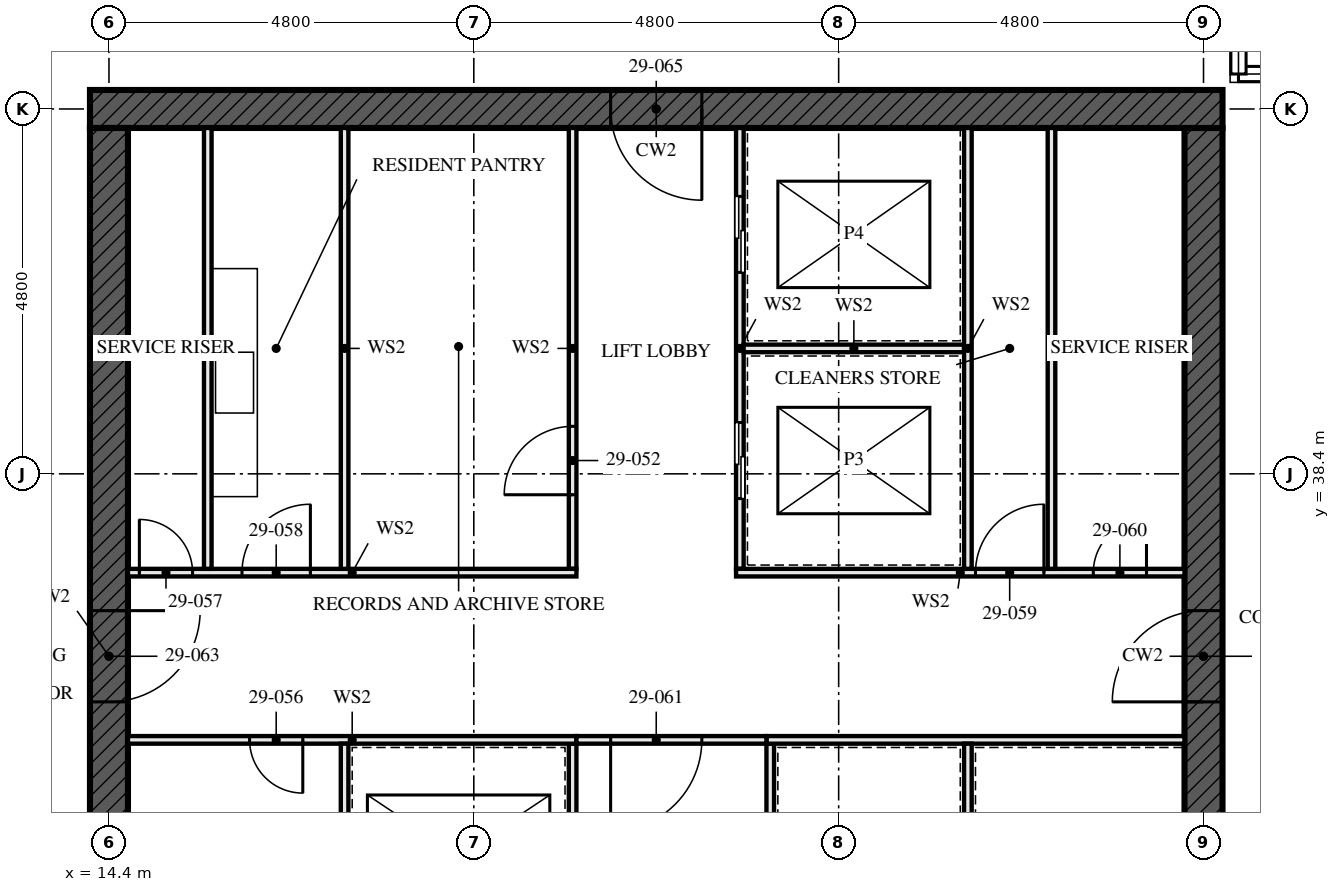
"""IFC4 building model, lengths in metres.
Left out: names, types, materials, properties, quantities, classifications, styles, units other than length and angle.
Written with IfcOpenShell. Run it as: python <this file> out.ifc"""

import sys

from ifc_helpers import new_model, si_unit, direction, frame, frame_2d, origin, place, context, subcontext, project, spatial, rectangle, extrude, element, fill, save


model = new_model("IFC4")
c1 = context("Model", 3, precision=1e-05, world=origin(), true_north=direction((0.0, 1.0)))
c2 = subcontext(c1, "Body", "Model", "MODEL_VIEW")
j1 = project(units=[si_unit("LENGTHUNIT", "METRE"), si_unit("PLANEANGLEUNIT", "RADIAN")], contexts=[c1])
p1 = place(None, origin())
s1 = spatial("IfcSite", under=j1, at=p1, CompositionType="ELEMENT")
p2 = place(p1, origin())
s2 = spatial("IfcBuilding", under=s1, at=p2, CompositionType="ELEMENT")
p3 = place(p2, frame((0.0, 0.0, 108.5)))
s3 = spatial("IfcBuildingStorey", under=s2, at=p3, CompositionType="ELEMENT", Elevation=108.5)
p4 = place(p3, frame((29.05, 43.2, -0.17), z_axis=(0.0, 0.0, 1.0), x_axis=(-1.0, 0.0, 0.0)))
e1 = element("IfcWall", 1, at=p4, inside=s3, PredefinedType="SHEAR", context=c2, shape_type="SweptSolid", body=[
    extrude(rectangle(XDim=14.9, YDim=0.5, at=frame_2d((7.45, 0.0))), origin(), (0.0, 0.0, 1.0), 3.5),
])
p5 = place(p4, frame((6.85, 0.0, 0.17)))
e2 = element("IfcOpeningElement", 2, at=p5, cuts=e1, PredefinedType="OPENING", context=c2, shape_type="SweptSolid", body=[
    extrude(rectangle(XDim=1.2, YDim=2.1, at=frame_2d((0.6, 1.05))), frame((0.0, 0.26, 0.0), z_axis=(0.0, -1.0, 0.0), x_axis=(1.0, 0.0, 0.0)), (0.0, 0.0, 1.0), 0.521),
])
p6 = place(p3, frame((14.4, 42.95, -0.17), z_axis=(0.0, 0.0, 1.0), x_axis=(0.0, -1.0, 0.0)))
e3 = element("IfcWall", 3, at=p6, inside=s3, PredefinedType="SHEAR", context=c2, shape_type="SweptSolid", body=[
    extrude(rectangle(XDim=13.9, YDim=0.5, at=frame_2d((6.95, 0.0))), origin(), (0.0, 0.0, 1.0), 3.5),
])
p7 = place(p6, frame((6.35, 0.0, 0.17)))
e4 = element("IfcOpeningElement", 4, at=p7, cuts=e3, PredefinedType="OPENING", context=c2, shape_type="SweptSolid", body=[
    extrude(rectangle(XDim=1.2, YDim=2.1, at=frame_2d((0.6, 1.05))), frame((0.0, 0.26, 0.0), z_axis=(0.0, -1.0, 0.0), x_axis=(1.0, 0.0, 0.0)), (0.0, 0.0, 1.0), 0.521),
])
p8 = place(p3, frame((28.8, 29.05, -0.17), z_axis=(0.0, 0.0, 1.0), x_axis=(0.0, 1.0, 0.0)))
e5 = element("IfcWall", 5, at=p8, inside=s3, PredefinedType="SHEAR", context=c2, shape_type="SweptSolid", body=[
    extrude(rectangle(XDim=13.9, YDim=0.5, at=frame_2d((6.95, 0.0))), origin(), (0.0, 0.0, 1.0), 3.5),
])
p9 = place(p8, frame((6.35, 0.0, 0.17)))
e6 = element("IfcOpeningElement", 6, at=p9, cuts=e5, PredefinedType="OPENING", context=c2, shape_type="SweptSolid", body=[
    extrude(rectangle(XDim=1.2, YDim=2.1, at=frame_2d((0.6, 1.05))), frame((0.0, 0.26, 0.0), z_axis=(0.0, -1.0, 0.0), x_axis=(1.0, 0.0, 0.0)), (0.0, 0.0, 1.0), 0.521),
])
for number, where, z_axis, x_axis in (
    (7, (15.7, 37.15, 0.0), (0.0, 0.0, 1.0), (0.0, 1.0, 0.0)),
    (8, (26.8, 37.15, 0.0), (0.0, 0.0, 1.0), (0.0, 1.0, 0.0)),
):
    element("IfcWall", number, at=place(p3, frame(where, z_axis=z_axis, x_axis=x_axis)), inside=s3, PredefinedType="SOLIDWALL", context=c2, shape_type="SweptSolid", body=[
        extrude(rectangle(XDim=5.8, YDim=0.1, at=frame_2d((2.9, 0.0))), origin(), (0.0, 0.0, 1.0), 3.33),
    ])
p10 = place(p3, frame((20.5, 29.05, 0.0), z_axis=(0.0, 0.0, 1.0), x_axis=(0.0, 1.0, 0.0)))
e9 = element("IfcWall", 9, at=p10, inside=s3, PredefinedType="SOLIDWALL", context=c2, shape_type="SweptSolid", body=[
    extrude(rectangle(XDim=5.8, YDim=0.1, at=frame_2d((2.9, 0.0))), origin(), (0.0, 0.0, 1.0), 3.33),
])
p11 = place(p10, frame((0.8, 0.0, 0.0)))
e10 = element("IfcOpeningElement", 10, at=p11, cuts=e9, PredefinedType="OPENING", context=c2, shape_type="SweptSolid", body=[
    extrude(rectangle(XDim=1.1, YDim=2.3, at=frame_2d((0.55, 1.15))), frame((0.0, 0.061, 0.0), z_axis=(0.0, -1.0, 0.0), x_axis=(1.0, 0.0, 0.0)), (0.0, 0.0, 1.0), 0.121),
])
p12 = place(p10, frame((3.775, 0.0, 0.0)))
e11 = element("IfcOpeningElement", 11, at=p12, cuts=e9, PredefinedType="OPENING", context=c2, shape_type="SweptSolid", body=[
    extrude(rectangle(XDim=1.1, YDim=2.3, at=frame_2d((0.55, 1.15))), frame((0.0, 0.061, 0.0), z_axis=(0.0, -1.0, 0.0), x_axis=(1.0, 0.0, 0.0)), (0.0, 0.0, 1.0), 0.121),
])
p13 = place(p3, frame((20.5, 37.15, 0.0), z_axis=(0.0, 0.0, 1.0), x_axis=(0.0, 1.0, 0.0)))
e12 = element("IfcWall", 12, at=p13, inside=s3, PredefinedType="SOLIDWALL", context=c2, shape_type="SweptSolid", body=[
    extrude(rectangle(XDim=5.8, YDim=0.1, at=frame_2d((2.9, 0.0))), origin(), (0.0, 0.0, 1.0), 3.33),
])
p14 = place(p13, frame((0.975, 0.0, 0.0)))
e13 = element("IfcOpeningElement", 13, at=p14, cuts=e12, PredefinedType="OPENING", context=c2, shape_type="SweptSolid", body=[
    extrude(rectangle(XDim=0.9, YDim=2.1, at=frame_2d((0.45, 1.05))), frame((0.0, 0.061, 0.0), z_axis=(0.0, -1.0, 0.0), x_axis=(1.0, 0.0, 0.0)), (0.0, 0.0, 1.0), 0.121),
])
p15 = place(p3, frame((22.7, 37.15, 0.0), z_axis=(0.0, 0.0, 1.0), x_axis=(0.0, 1.0, 0.0)))
e14 = element("IfcWall", 14, at=p15, inside=s3, PredefinedType="SOLIDWALL", context=c2, shape_type="SweptSolid", body=[
    extrude(rectangle(XDim=5.8, YDim=0.1, at=frame_2d((2.9, 0.0))), origin(), (0.0, 0.0, 1.0), 3.33),
])
p16 = place(p15, frame((0.925, 0.0, 0.0)))
e15 = element("IfcOpeningElement", 15, at=p16, cuts=e14, PredefinedType="OPENING", context=c2, shape_type="SweptSolid", body=[
    extrude(rectangle(XDim=1.0, YDim=2.1, at=frame_2d((0.5, 1.05))), frame((0.0, 0.061, 0.0), z_axis=(0.0, -1.0, 0.0), x_axis=(1.0, 0.0, 0.0)), (0.0, 0.0, 1.0), 0.121),
])
p17 = place(p15, frame((3.9, 0.0, 0.0)))
e16 = element("IfcOpeningElement", 16, at=p17, cuts=e14, PredefinedType="OPENING", context=c2, shape_type="SweptSolid", body=[
    extrude(rectangle(XDim=1.0, YDim=2.1, at=frame_2d((0.5, 1.05))), frame((0.0, 0.061, 0.0), z_axis=(0.0, -1.0, 0.0), x_axis=(1.0, 0.0, 0.0)), (0.0, 0.0, 1.0), 0.121),
])
p18 = place(p3, frame((23.1, 29.05, 0.0), z_axis=(0.0, 0.0, 1.0), x_axis=(0.0, 1.0, 0.0)))
e17 = element("IfcWall", 17, at=p18, inside=s3, PredefinedType="SOLIDWALL", context=c2, shape_type="SweptSolid", body=[
    extrude(rectangle(XDim=5.8, YDim=0.1, at=frame_2d((2.9, 0.0))), origin(), (0.0, 0.0, 1.0), 3.33),
])
p19 = place(p18, frame((1.0, 0.0, 0.0)))
e18 = element("IfcOpeningElement", 18, at=p19, cuts=e17, PredefinedType="OPENING", context=c2, shape_type="SweptSolid", body=[
    extrude(rectangle(XDim=0.7, YDim=2.1, at=frame_2d((0.35, 1.05))), frame((0.0, 0.061, 0.0), z_axis=(0.0, -1.0, 0.0), x_axis=(1.0, 0.0, 0.0)), (0.0, 0.0, 1.0), 0.121),
])
p20 = place(p3, frame((14.65, 34.9, 0.0), z_axis=(0.0, 0.0, 1.0), x_axis=(1.0, 0.0, 0.0)))
e19 = element("IfcWall", 19, at=p20, inside=s3, PredefinedType="SOLIDWALL", context=c2, shape_type="SweptSolid", body=[
    extrude(rectangle(XDim=5.9, YDim=0.1, at=frame_2d((2.95, 0.0))), origin(), (0.0, 0.0, 1.0), 3.33),
])
p21 = place(p20, frame((1.6, 0.0, 0.0)))
e20 = element("IfcOpeningElement", 20, at=p21, cuts=e19, PredefinedType="OPENING", context=c2, shape_type="SweptSolid", body=[
    extrude(rectangle(XDim=0.7, YDim=2.1, at=frame_2d((0.35, 1.05))), frame((0.0, 0.061, 0.0), z_axis=(0.0, -1.0, 0.0), x_axis=(1.0, 0.0, 0.0)), (0.0, 0.0, 1.0), 0.121),
])
p22 = place(p3, frame((23.05, 34.9, 0.0), z_axis=(0.0, 0.0, 1.0), x_axis=(1.0, 0.0, 0.0)))
e21 = element("IfcWall", 21, at=p22, inside=s3, PredefinedType="SOLIDWALL", context=c2, shape_type="SweptSolid", body=[
    extrude(rectangle(XDim=5.5, YDim=0.1, at=frame_2d((2.75, 0.0))), origin(), (0.0, 0.0, 1.0), 3.33),
])
p23 = place(p3, frame((14.65, 37.1, 0.0), z_axis=(0.0, 0.0, 1.0), x_axis=(1.0, 0.0, 0.0)))
e22 = element("IfcWall", 22, at=p23, inside=s3, PredefinedType="SOLIDWALL", context=c2, shape_type="SweptSolid", body=[
    extrude(rectangle(XDim=5.9, YDim=0.1, at=frame_2d((2.95, 0.0))), origin(), (0.0, 0.0, 1.0), 3.33),
])
p24 = place(p23, frame((0.15, 0.0, 0.0)))
e23 = element("IfcOpeningElement", 23, at=p24, cuts=e22, PredefinedType="OPENING", context=c2, shape_type="SweptSolid", body=[
    extrude(rectangle(XDim=0.7, YDim=2.1, at=frame_2d((0.35, 1.05))), frame((0.0, 0.061, 0.0), z_axis=(0.0, -1.0, 0.0), x_axis=(1.0, 0.0, 0.0)), (0.0, 0.0, 1.0), 0.121),
])
p25 = place(p23, frame((1.5, 0.0, 0.0)))
e24 = element("IfcOpeningElement", 24, at=p25, cuts=e22, PredefinedType="OPENING", context=c2, shape_type="SweptSolid", body=[
    extrude(rectangle(XDim=0.9, YDim=2.1, at=frame_2d((0.45, 1.05))), frame((0.0, 0.061, 0.0), z_axis=(0.0, -1.0, 0.0), x_axis=(1.0, 0.0, 0.0)), (0.0, 0.0, 1.0), 0.121),
])
p26 = place(p3, frame((22.65, 37.1, 0.0), z_axis=(0.0, 0.0, 1.0), x_axis=(1.0, 0.0, 0.0)))
e25 = element("IfcWall", 25, at=p26, inside=s3, PredefinedType="SOLIDWALL", context=c2, shape_type="SweptSolid", body=[
    extrude(rectangle(XDim=5.9, YDim=0.1, at=frame_2d((2.95, 0.0))), origin(), (0.0, 0.0, 1.0), 3.33),
])
p27 = place(p26, frame((3.15, 0.0, 0.0)))
e26 = element("IfcOpeningElement", 26, at=p27, cuts=e25, PredefinedType="OPENING", context=c2, shape_type="SweptSolid", body=[
    extrude(rectangle(XDim=0.9, YDim=2.1, at=frame_2d((0.45, 1.05))), frame((0.0, 0.061, 0.0), z_axis=(0.0, -1.0, 0.0), x_axis=(1.0, 0.0, 0.0)), (0.0, 0.0, 1.0), 0.121),
])
p28 = place(p26, frame((4.7, 0.0, 0.0)))
e27 = element("IfcOpeningElement", 27, at=p28, cuts=e25, PredefinedType="OPENING", context=c2, shape_type="SweptSolid", body=[
    extrude(rectangle(XDim=0.7, YDim=2.1, at=frame_2d((0.35, 1.05))), frame((0.0, 0.061, 0.0), z_axis=(0.0, -1.0, 0.0), x_axis=(1.0, 0.0, 0.0)), (0.0, 0.0, 1.0), 0.121),
])
p29 = place(p3, frame((20.55, 34.9, 0.0), z_axis=(0.0, 0.0, 1.0), x_axis=(1.0, 0.0, 0.0)))
e28 = element("IfcWall", 28, at=p29, inside=s3, PredefinedType="SOLIDWALL", context=c2, shape_type="SweptSolid", body=[
    extrude(rectangle(XDim=2.5, YDim=0.1, at=frame_2d((1.25, 0.0))), origin(), (0.0, 0.0, 1.0), 3.33),
])
p30 = place(p29, frame((0.45, 0.0, 0.0)))
e29 = element("IfcOpeningElement", 29, at=p30, cuts=e28, PredefinedType="OPENING", context=c2, shape_type="SweptSolid", body=[
    extrude(rectangle(XDim=1.2, YDim=2.1, at=frame_2d((0.6, 1.05))), frame((0.0, 0.061, 0.0), z_axis=(0.0, -1.0, 0.0), x_axis=(1.0, 0.0, 0.0)), (0.0, 0.0, 1.0), 0.121),
])
for number, where, z_axis, x_axis in (
    (30, (17.5, 29.05, 0.0), (0.0, 0.0, 1.0), (0.0, 1.0, 0.0)),
    (31, (17.5, 37.15, 0.0), (0.0, 0.0, 1.0), (0.0, 1.0, 0.0)),
):
    element("IfcWall", number, at=place(p3, frame(where, z_axis=z_axis, x_axis=x_axis)), inside=s3, PredefinedType="SOLIDWALL", context=c2, shape_type="SweptSolid", body=[
        extrude(rectangle(XDim=5.8, YDim=0.1, at=frame_2d((2.9, 0.0))), origin(), (0.0, 0.0, 1.0), 3.33),
    ])
p31 = place(p3, frame((22.75, 40.05, 0.0), z_axis=(0.0, 0.0, 1.0), x_axis=(1.0, 0.0, 0.0)))
e32 = element("IfcWall", 32, at=p31, inside=s3, PredefinedType="SOLIDWALL", context=c2, shape_type="SweptSolid", body=[
    extrude(rectangle(XDim=2.9, YDim=0.1, at=frame_2d((1.45, 0.0))), origin(), (0.0, 0.0, 1.0), 3.33),
])
p32 = place(p3, frame((25.7, 37.15, 0.0), z_axis=(0.0, 0.0, 1.0), x_axis=(0.0, 1.0, 0.0)))
e33 = element("IfcWall", 33, at=p32, inside=s3, PredefinedType="SOLIDWALL", context=c2, shape_type="SweptSolid", body=[
    extrude(rectangle(XDim=5.8, YDim=0.1, at=frame_2d((2.9, 0.0))), origin(), (0.0, 0.0, 1.0), 3.33),
])
p33 = place(p3, frame((25.7, 31.95, 0.0), z_axis=(0.0, 0.0, 1.0), x_axis=(0.0, 1.0, 0.0)))
e34 = element("IfcWall", 34, at=p33, inside=s3, PredefinedType="SOLIDWALL", context=c2, shape_type="SweptSolid", body=[
    extrude(rectangle(XDim=2.9, YDim=0.1, at=frame_2d((1.45, 0.0))), origin(), (0.0, 0.0, 1.0), 3.33),
])
p34 = place(p14, origin())
e35 = element("IfcDoor", 35, at=p34, inside=s3, OperationType="SINGLE_SWING_RIGHT", PredefinedType="DOOR", context=c2, shape_type="SweptSolid", body=[
    extrude(rectangle(XDim=0.9, YDim=2.1, at=frame_2d((0.45, 1.05))), frame((0.0, 0.027, 0.0), z_axis=(0.0, -1.0, 0.0), x_axis=(1.0, 0.0, 0.0)), (0.0, 0.0, 1.0), 0.054),
])
fill(e13, e35)
p35 = place(p16, origin())
e36 = element("IfcDoor", 36, at=p35, inside=s3, OperationType="SLIDING_TO_LEFT", PredefinedType="DOOR", context=c2, shape_type="SweptSolid", body=[
    extrude(rectangle(XDim=1.0, YDim=2.1, at=frame_2d((0.5, 1.05))), frame((0.0, 0.05, 0.0), z_axis=(0.0, -1.0, 0.0), x_axis=(1.0, 0.0, 0.0)), (0.0, 0.0, 1.0), 0.1),
])
fill(e15, e36)
p36 = place(p17, origin())
e37 = element("IfcDoor", 37, at=p36, inside=s3, OperationType="SLIDING_TO_LEFT", PredefinedType="DOOR", context=c2, shape_type="SweptSolid", body=[
    extrude(rectangle(XDim=1.0, YDim=2.1, at=frame_2d((0.5, 1.05))), frame((0.0, 0.05, 0.0), z_axis=(0.0, -1.0, 0.0), x_axis=(1.0, 0.0, 0.0)), (0.0, 0.0, 1.0), 0.1),
])
fill(e16, e37)
p37 = place(p21, frame((0.7, 0.0, 0.0), z_axis=(0.0, 0.0, 1.0), x_axis=(-1.0, 0.0, 0.0)))
e38 = element("IfcDoor", 38, at=p37, inside=s3, OperationType="SINGLE_SWING_RIGHT", PredefinedType="DOOR", context=c2, shape_type="SweptSolid", body=[
    extrude(rectangle(XDim=0.7, YDim=2.1, at=frame_2d((0.35, 1.05))), frame((0.0, 0.027, 0.0), z_axis=(0.0, -1.0, 0.0), x_axis=(1.0, 0.0, 0.0)), (0.0, 0.0, 1.0), 0.054),
])
fill(e20, e38)
p38 = place(p24, origin())
e39 = element("IfcDoor", 39, at=p38, inside=s3, OperationType="SINGLE_SWING_RIGHT", PredefinedType="DOOR", context=c2, shape_type="SweptSolid", body=[
    extrude(rectangle(XDim=0.7, YDim=2.1, at=frame_2d((0.35, 1.05))), frame((0.0, 0.027, 0.0), z_axis=(0.0, -1.0, 0.0), x_axis=(1.0, 0.0, 0.0)), (0.0, 0.0, 1.0), 0.054),
])
fill(e23, e39)
p39 = place(p25, origin())
e40 = element("IfcDoor", 40, at=p39, inside=s3, OperationType="SINGLE_SWING_LEFT", PredefinedType="DOOR", context=c2, shape_type="SweptSolid", body=[
    extrude(rectangle(XDim=0.9, YDim=2.1, at=frame_2d((0.45, 1.05))), frame((0.0, 0.027, 0.0), z_axis=(0.0, -1.0, 0.0), x_axis=(1.0, 0.0, 0.0)), (0.0, 0.0, 1.0), 0.054),
])
fill(e24, e40)
p40 = place(p27, origin())
e41 = element("IfcDoor", 41, at=p40, inside=s3, OperationType="SINGLE_SWING_LEFT", PredefinedType="DOOR", context=c2, shape_type="SweptSolid", body=[
    extrude(rectangle(XDim=0.9, YDim=2.1, at=frame_2d((0.45, 1.05))), frame((0.0, 0.027, 0.0), z_axis=(0.0, -1.0, 0.0), x_axis=(1.0, 0.0, 0.0)), (0.0, 0.0, 1.0), 0.054),
])
fill(e26, e41)
p41 = place(p28, origin())
e42 = element("IfcDoor", 42, at=p41, inside=s3, OperationType="SINGLE_SWING_LEFT", PredefinedType="DOOR", context=c2, shape_type="SweptSolid", body=[
    extrude(rectangle(XDim=0.7, YDim=2.1, at=frame_2d((0.35, 1.05))), frame((0.0, 0.027, 0.0), z_axis=(0.0, -1.0, 0.0), x_axis=(1.0, 0.0, 0.0)), (0.0, 0.0, 1.0), 0.054),
])
fill(e27, e42)
p42 = place(p30, frame((1.2, 0.0, 0.0), z_axis=(0.0, 0.0, 1.0), x_axis=(-1.0, 0.0, 0.0)))
e43 = element("IfcDoor", 43, at=p42, inside=s3, OperationType="SINGLE_SWING_LEFT", PredefinedType="DOOR", context=c2, shape_type="SweptSolid", body=[
    extrude(rectangle(XDim=1.2, YDim=2.1, at=frame_2d((0.6, 1.05))), frame((0.0, 0.027, 0.0), z_axis=(0.0, -1.0, 0.0), x_axis=(1.0, 0.0, 0.0)), (0.0, 0.0, 1.0), 0.054),
])
fill(e29, e43)
p43 = place(p7, origin())
e44 = element("IfcDoor", 44, at=p43, inside=s3, OperationType="SINGLE_SWING_LEFT", PredefinedType="DOOR", context=c2, shape_type="SweptSolid", body=[
    extrude(rectangle(XDim=1.2, YDim=2.1, at=frame_2d((0.6, 1.05))), frame((0.0, 0.027, 0.0), z_axis=(0.0, -1.0, 0.0), x_axis=(1.0, 0.0, 0.0)), (0.0, 0.0, 1.0), 0.054),
])
fill(e4, e44)
p44 = place(p9, origin())
e45 = element("IfcDoor", 45, at=p44, inside=s3, OperationType="SINGLE_SWING_LEFT", PredefinedType="DOOR", context=c2, shape_type="SweptSolid", body=[
    extrude(rectangle(XDim=1.2, YDim=2.1, at=frame_2d((0.6, 1.05))), frame((0.0, 0.027, 0.0), z_axis=(0.0, -1.0, 0.0), x_axis=(1.0, 0.0, 0.0)), (0.0, 0.0, 1.0), 0.054),
])
fill(e6, e45)
p45 = place(p5, origin())
e46 = element("IfcDoor", 46, at=p45, inside=s3, OperationType="SINGLE_SWING_LEFT", PredefinedType="DOOR", context=c2, shape_type="SweptSolid", body=[
    extrude(rectangle(XDim=1.2, YDim=2.1, at=frame_2d((0.6, 1.05))), frame((0.0, 0.027, 0.0), z_axis=(0.0, -1.0, 0.0), x_axis=(1.0, 0.0, 0.0)), (0.0, 0.0, 1.0), 0.054),
])
fill(e2, e46)
save(model, sys.argv[1])
